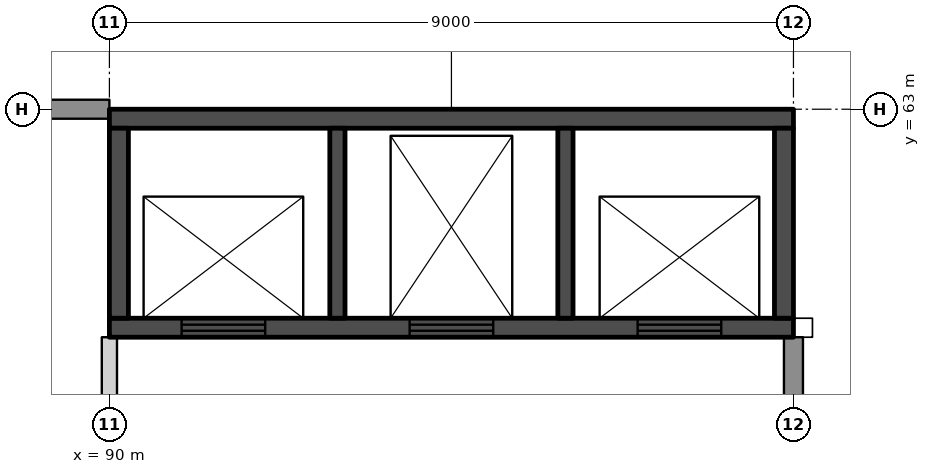
"""IFC4 building model, lengths in metres.
Left out: names, types, materials, properties, quantities, classifications, styles, units other than length and angle.
Written with IfcOpenShell. Run it as: python <this file> out.ifc"""

import sys

from ifc_helpers import new_model, si_unit, direction, frame, frame_2d, origin, place, context, subcontext, project, spatial, rectangle, extrude, element, fill, save


model = new_model("IFC4")
c1 = context("Model", 3, precision=1e-05, world=origin(), true_north=direction((0.0, 1.0)))
c2 = subcontext(c1, "Body", "Model", "MODEL_VIEW")
j1 = project(units=[si_unit("LENGTHUNIT", "METRE"), si_unit("PLANEANGLEUNIT", "RADIAN")], contexts=[c1])
p1 = place(None, origin())
s1 = spatial("IfcSite", under=j1, at=p1, CompositionType="ELEMENT")
p2 = place(p1, origin())
s2 = spatial("IfcBuilding", under=s1, at=p2, CompositionType="ELEMENT")
p3 = place(p2, frame((0.0, 0.0, 22.0)))
s3 = spatial("IfcBuildingStorey", under=s2, at=p3, CompositionType="ELEMENT", Elevation=22.0)
p4 = place(p3, frame((90.0, 54.35, 0.0), z_axis=(0.0, 0.0, 1.0), x_axis=(0.0, 1.0, 0.0)))
e1 = element("IfcWall", 1, at=p4, inside=s3, PredefinedType="PARTITIONING", context=c2, shape_type="SweptSolid", body=[
    extrude(rectangle(XDim=5.65, YDim=0.2, at=frame_2d((2.825, 0.0))), origin(), (0.0, 0.0, 1.0), 5.0),
])
p5 = place(p3, frame((90.0, 60.125, 0.0), z_axis=(0.0, 0.0, 1.0), x_axis=(1.0, 0.0, 0.0)))
e2 = element("IfcWall", 2, at=p5, inside=s3, PredefinedType="SHEAR", context=c2, shape_type="SweptSolid", body=[
    extrude(rectangle(XDim=9.0, YDim=0.25, at=frame_2d((4.5, 0.0))), origin(), (0.0, 0.0, 1.0), 6.0),
])
p6 = place(p5, frame((0.95, 0.0, 0.0)))
e3 = element("IfcOpeningElement", 3, at=p6, cuts=e2, PredefinedType="OPENING", context=c2, shape_type="SweptSolid", body=[
    extrude(rectangle(XDim=1.1, YDim=2.1, at=frame_2d((0.55, 1.05))), frame((0.0, 0.135, 0.0), z_axis=(0.0, -1.0, 0.0), x_axis=(1.0, 0.0, 0.0)), (0.0, 0.0, 1.0), 0.27),
])
p7 = place(p5, frame((3.95, 0.0, 0.0)))
e4 = element("IfcOpeningElement", 4, at=p7, cuts=e2, PredefinedType="OPENING", context=c2, shape_type="SweptSolid", body=[
    extrude(rectangle(XDim=1.1, YDim=2.1, at=frame_2d((0.55, 1.05))), frame((0.0, 0.135, 0.0), z_axis=(0.0, -1.0, 0.0), x_axis=(1.0, 0.0, 0.0)), (0.0, 0.0, 1.0), 0.27),
])
p8 = place(p5, frame((6.95, 0.0, 0.0)))
e5 = element("IfcOpeningElement", 5, at=p8, cuts=e2, PredefinedType="OPENING", context=c2, shape_type="SweptSolid", body=[
    extrude(rectangle(XDim=1.1, YDim=2.1, at=frame_2d((0.55, 1.05))), frame((0.0, 0.135, 0.0), z_axis=(0.0, -1.0, 0.0), x_axis=(1.0, 0.0, 0.0)), (0.0, 0.0, 1.0), 0.27),
])
p9 = place(p3, frame((90.0, 62.875, 0.0), z_axis=(0.0, 0.0, 1.0), x_axis=(1.0, 0.0, 0.0)))
e6 = element("IfcWall", 6, at=p9, inside=s3, PredefinedType="SHEAR", context=c2, shape_type="SweptSolid", body=[
    extrude(rectangle(XDim=9.0, YDim=0.25, at=frame_2d((4.5, 0.0))), origin(), (0.0, 0.0, 1.0), 6.0),
])
for number, where, z_axis, x_axis in (
    (7, (90.125, 60.25, 0.0), (0.0, 0.0, 1.0), (0.0, 1.0, 0.0)),
    (8, (98.875, 60.25, 0.0), (0.0, 0.0, 1.0), (0.0, 1.0, 0.0)),
):
    element("IfcWall", number, at=place(p3, frame(where, z_axis=z_axis, x_axis=x_axis)), inside=s3, PredefinedType="SHEAR", context=c2, shape_type="SweptSolid", body=[
        extrude(rectangle(XDim=2.5, YDim=0.25, at=frame_2d((1.25, 0.0))), origin(), (0.0, 0.0, 1.0), 6.0),
    ])
for number, where, z_axis, x_axis in (
    (9, (93.0, 60.25, 0.0), (0.0, 0.0, 1.0), (0.0, 1.0, 0.0)),
    (10, (96.0, 60.25, 0.0), (0.0, 0.0, 1.0), (0.0, 1.0, 0.0)),
):
    element("IfcWall", number, at=place(p3, frame(where, z_axis=z_axis, x_axis=x_axis)), inside=s3, PredefinedType="SHEAR", context=c2, shape_type="SweptSolid", body=[
        extrude(rectangle(XDim=2.5, YDim=0.2, at=frame_2d((1.25, 0.0))), origin(), (0.0, 0.0, 1.0), 6.0),
    ])
p10 = place(p3, frame((99.0, 54.35, 0.0), z_axis=(0.0, 0.0, 1.0), x_axis=(0.0, 1.0, 0.0)))
e11 = element("IfcWall", 11, at=p10, inside=s3, PredefinedType="SOLIDWALL", context=c2, shape_type="SweptSolid", body=[
    extrude(rectangle(XDim=5.65, YDim=0.25, at=frame_2d((2.825, 0.0))), origin(), (0.0, 0.0, 1.0), 5.0),
])
p11 = place(p3, frame((81.0, 63.0, 0.0), z_axis=(0.0, 0.0, 1.0), x_axis=(1.0, 0.0, 0.0)))
e12 = element("IfcWall", 12, at=p11, inside=s3, PredefinedType="SOLIDWALL", context=c2, shape_type="SweptSolid", body=[
    extrude(rectangle(XDim=9.0, YDim=0.25, at=frame_2d((4.5, 0.0))), origin(), (0.0, 0.0, 1.0), 4.7),
])
p12 = place(p6, origin())
e13 = element("IfcDoor", 13, at=p12, inside=s3, OperationType="DOUBLE_DOOR_SLIDING", PredefinedType="DOOR", context=c2, shape_type="SweptSolid", body=[
    extrude(rectangle(XDim=1.1, YDim=2.1, at=frame_2d((0.55, 1.05))), frame((0.0, 0.025, 0.0), z_axis=(0.0, -1.0, 0.0), x_axis=(1.0, 0.0, 0.0)), (0.0, 0.0, 1.0), 0.05),
])
fill(e3, e13)
p13 = place(p7, origin())
e14 = element("IfcDoor", 14, at=p13, inside=s3, OperationType="DOUBLE_DOOR_SLIDING", PredefinedType="DOOR", context=c2, shape_type="SweptSolid", body=[
    extrude(rectangle(XDim=1.1, YDim=2.1, at=frame_2d((0.55, 1.05))), frame((0.0, 0.025, 0.0), z_axis=(0.0, -1.0, 0.0), x_axis=(1.0, 0.0, 0.0)), (0.0, 0.0, 1.0), 0.05),
])
fill(e4, e14)
p14 = place(p8, origin())
e15 = element("IfcDoor", 15, at=p14, inside=s3, OperationType="DOUBLE_DOOR_SLIDING", PredefinedType="DOOR", context=c2, shape_type="SweptSolid", body=[
    extrude(rectangle(XDim=1.1, YDim=2.1, at=frame_2d((0.55, 1.05))), frame((0.0, 0.025, 0.0), z_axis=(0.0, -1.0, 0.0), x_axis=(1.0, 0.0, 0.0)), (0.0, 0.0, 1.0), 0.05),
])
fill(e5, e15)
save(model, sys.argv[1])
